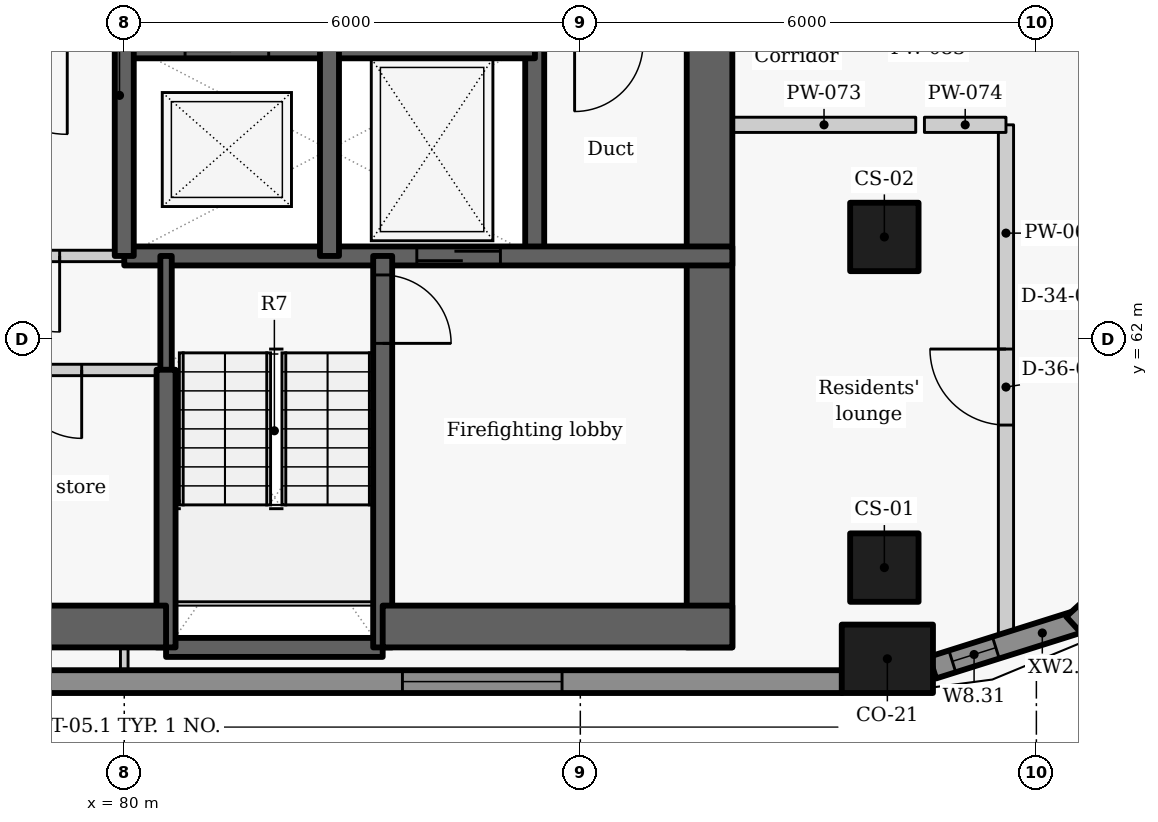
"""IFC4 building model, lengths in metres.
Left out: names, types, materials, properties, quantities, classifications, styles, units other than length and angle.
Written with IfcOpenShell. Run it as: python <this file> out.ifc"""

import sys

from ifc_helpers import new_model, si_unit, direction, frame, frame_2d, origin, origin_2d, place, context, subcontext, project, spatial, rectangle, extrude, element, fill, save


model = new_model("IFC4")
c1 = context("Model", 3, precision=1e-05, world=origin(), true_north=direction((0.0, 1.0)))
c2 = subcontext(c1, "Body", "Model", "MODEL_VIEW")
j1 = project(units=[si_unit("LENGTHUNIT", "METRE"), si_unit("PLANEANGLEUNIT", "RADIAN")], contexts=[c1])
p1 = place(None, origin())
s1 = spatial("IfcSite", under=j1, at=p1, CompositionType="ELEMENT")
p2 = place(p1, origin())
s2 = spatial("IfcBuilding", under=s1, at=p2, CompositionType="ELEMENT")
p3 = place(p2, frame((0.0, 0.0, 216.3)))
s3 = spatial("IfcBuildingStorey", under=s2, at=p3, CompositionType="ELEMENT", Elevation=216.3)
p4 = place(p3, frame((90.04, 57.8, 0.0), z_axis=(0.0, 0.0, 1.0), x_axis=(1.0, 0.0, 0.0)))
e1 = element("IfcColumn", 1, at=p4, inside=s3, PredefinedType="COLUMN", context=c2, shape_type="SweptSolid", body=[
    extrude(rectangle(XDim=1.2, YDim=0.9, at=origin_2d()), origin(), (0.0, 0.0, 1.0), 3.3),
])
for number, where, z_axis, x_axis in (
    (2, (90.0, 59.0, 0.0), (0.0, 0.0, 1.0), (0.0, 1.0, 0.0)),
    (3, (90.0, 63.35, 0.0), (0.0, 0.0, 1.0), (0.0, 1.0, 0.0)),
):
    element("IfcColumn", number, at=place(p3, frame(where, z_axis=z_axis, x_axis=x_axis)), inside=s3, PredefinedType="COLUMN", context=c2, shape_type="SweptSolid", body=[
        extrude(rectangle(XDim=0.9, YDim=0.9, at=origin_2d()), origin(), (0.0, 0.0, 1.0), 3.3),
    ])
p5 = place(p3, frame((70.551, 57.5, 0.0), z_axis=(0.0, 0.0, 1.0), x_axis=(1.0, 0.0, 0.0)))
e4 = element("IfcWall", 4, at=p5, inside=s3, PredefinedType="SOLIDWALL", context=c2, shape_type="SweptSolid", body=[
    extrude(rectangle(XDim=18.893, YDim=0.3, at=frame_2d((9.446, 0.0))), origin(), (0.0, 0.0, 1.0), 2.05),
])
p6 = place(p5, frame((3.687, 0.0, 0.9)))
e5 = element("IfcOpeningElement", 5, at=p6, cuts=e4, PredefinedType="OPENING", context=c2, shape_type="SweptSolid", body=[
    extrude(rectangle(XDim=2.1, YDim=1.1, at=frame_2d((1.05, 0.55))), frame((0.0, 0.16, 0.0), z_axis=(0.0, -1.0, 0.0), x_axis=(1.0, 0.0, 0.0)), (0.0, 0.0, 1.0), 0.32),
])
p7 = place(p5, frame((13.109, 0.0, 0.9)))
e6 = element("IfcOpeningElement", 6, at=p7, cuts=e4, PredefinedType="OPENING", context=c2, shape_type="SweptSolid", body=[
    extrude(rectangle(XDim=2.1, YDim=1.1, at=frame_2d((1.05, 0.55))), frame((0.0, 0.16, 0.0), z_axis=(0.0, -1.0, 0.0), x_axis=(1.0, 0.0, 0.0)), (0.0, 0.0, 1.0), 0.32),
])
p8 = place(p3, frame((90.636, 57.685, 0.0), z_axis=(0.0, 0.0, 1.0), x_axis=(0.95368324118, 0.300812691707, 0.0)))
e7 = element("IfcWall", 7, at=p8, inside=s3, PredefinedType="SOLIDWALL", context=c2, shape_type="SweptSolid", body=[
    extrude(rectangle(XDim=2.053, YDim=0.3, at=frame_2d((1.027, 0.0))), origin(), (0.0, 0.0, 1.0), 2.05),
])
p9 = place(p8, frame((0.271, 0.0, 0.9)))
e8 = element("IfcOpeningElement", 8, at=p9, cuts=e7, PredefinedType="OPENING", context=c2, shape_type="SweptSolid", body=[
    extrude(rectangle(XDim=0.6, YDim=1.1, at=frame_2d((0.3, 0.55))), frame((0.0, 0.16, 0.0), z_axis=(0.0, -1.0, 0.0), x_axis=(1.0, 0.0, 0.0)), (0.0, 0.0, 1.0), 0.32),
])
p10 = place(p3, frame((92.494, 58.244, 0.0), z_axis=(0.0, 0.0, 1.0), x_axis=(0.73764876128, 0.675184645102, 0.0)))
e9 = element("IfcWall", 9, at=p10, inside=s3, PredefinedType="SOLIDWALL", context=c2, shape_type="SweptSolid", body=[
    extrude(rectangle(XDim=2.048, YDim=0.3, at=frame_2d((1.024, 0.0))), origin(), (0.0, 0.0, 1.0), 2.05),
])
p11 = place(p3, frame((85.4, 63.1, -0.275), z_axis=(0.0, 0.0, 1.0), x_axis=(0.0, 1.0, 0.0)))
e10 = element("IfcWall", 10, at=p11, inside=s3, PredefinedType="SHEAR", context=c2, shape_type="SweptSolid", body=[
    extrude(rectangle(XDim=2.8, YDim=0.25, at=frame_2d((1.4, 0.0))), origin(), (0.0, 0.0, 1.0), 3.225),
])
p12 = place(p3, frame((87.7, 72.2, -0.275), z_axis=(0.0, 0.0, 1.0), x_axis=(0.0, -1.0, 0.0)))
e11 = element("IfcWall", 11, at=p12, inside=s3, PredefinedType="SHEAR", context=c2, shape_type="SweptSolid", body=[
    extrude(rectangle(XDim=14.25, YDim=0.6, at=frame_2d((7.125, 0.0))), origin(), (0.0, 0.0, 1.0), 3.225),
])
p13 = place(p12, frame((3.852, 0.0, 0.275)))
e12 = element("IfcOpeningElement", 12, at=p13, cuts=e11, PredefinedType="OPENING", context=c2, shape_type="SweptSolid", body=[
    extrude(rectangle(XDim=1.5, YDim=2.1, at=frame_2d((0.75, 1.05))), frame((0.0, 0.31, 0.0), z_axis=(0.0, -1.0, 0.0), x_axis=(1.0, 0.0, 0.0)), (0.0, 0.0, 1.0), 0.62),
])
p14 = place(p3, frame((79.997, 65.9, -0.275), z_axis=(0.0, 0.0, 1.0), x_axis=(1.0, 0.0, 0.0)))
e13 = element("IfcWall", 13, at=p14, inside=s3, PredefinedType="SHEAR", context=c2, shape_type="SweptSolid", body=[
    extrude(rectangle(XDim=5.406, YDim=0.4, at=frame_2d((2.703, 0.0))), origin(), (0.0, 0.0, 1.0), 3.225),
])
p15 = place(p14, frame((0.803, 0.0, 0.275)))
e14 = element("IfcOpeningElement", 14, at=p15, cuts=e13, PredefinedType="OPENING", context=c2, shape_type="SweptSolid", body=[
    extrude(rectangle(XDim=1.1, YDim=2.1, at=frame_2d((0.55, 1.05))), frame((0.0, 0.21, 0.0), z_axis=(0.0, -1.0, 0.0), x_axis=(1.0, 0.0, 0.0)), (0.0, 0.0, 1.0), 0.42),
])
p16 = place(p3, frame((80.0, 63.1, -0.275), z_axis=(0.0, 0.0, 1.0), x_axis=(1.0, 0.0, 0.0)))
e15 = element("IfcWall", 15, at=p16, inside=s3, PredefinedType="SHEAR", context=c2, shape_type="SweptSolid", body=[
    extrude(rectangle(XDim=8.0, YDim=0.25, at=frame_2d((4.0, 0.0))), origin(), (0.0, 0.0, 1.0), 3.225),
])
p17 = place(p16, frame((3.849, 0.0, 0.275)))
e16 = element("IfcOpeningElement", 16, at=p17, cuts=e15, PredefinedType="OPENING", context=c2, shape_type="SweptSolid", body=[
    extrude(rectangle(XDim=1.1, YDim=2.1, at=frame_2d((0.55, 1.05))), frame((0.0, 0.135, 0.0), z_axis=(0.0, -1.0, 0.0), x_axis=(1.0, 0.0, 0.0)), (0.0, 0.0, 1.0), 0.27),
])
p18 = place(p3, frame((80.0, 63.1, -0.275), z_axis=(0.0, 0.0, 1.0), x_axis=(0.0, 1.0, 0.0)))
e17 = element("IfcWall", 17, at=p18, inside=s3, PredefinedType="SHEAR", context=c2, shape_type="SweptSolid", body=[
    extrude(rectangle(XDim=2.8, YDim=0.25, at=frame_2d((1.4, 0.0))), origin(), (0.0, 0.0, 1.0), 3.225),
])
p19 = place(p3, frame((80.0, 63.1, 0.0), z_axis=(0.0, 0.0, 1.0), x_axis=(-1.0, 0.0, 0.0)))
e18 = element("IfcWall", 18, at=p19, inside=s3, PredefinedType="PARTITIONING", context=c2, shape_type="SweptSolid", body=[
    extrude(rectangle(XDim=2.7, YDim=0.15, at=frame_2d((1.35, 0.0))), origin(), (0.0, 0.0, 1.0), 2.95),
])
p20 = place(p19, frame((0.85, 0.0, 0.0)))
e19 = element("IfcOpeningElement", 19, at=p20, cuts=e18, PredefinedType="OPENING", context=c2, shape_type="SweptSolid", body=[
    extrude(rectangle(XDim=1.0, YDim=2.1, at=frame_2d((0.5, 1.05))), frame((0.0, 0.085, 0.0), z_axis=(0.0, -1.0, 0.0), x_axis=(1.0, 0.0, 0.0)), (0.0, 0.0, 1.0), 0.17),
])
p21 = place(p3, frame((82.7, 63.1, -0.275), z_axis=(0.0, 0.0, 1.0), x_axis=(0.0, 1.0, 0.0)))
e20 = element("IfcWall", 20, at=p21, inside=s3, PredefinedType="SHEAR", context=c2, shape_type="SweptSolid", body=[
    extrude(rectangle(XDim=2.8, YDim=0.25, at=frame_2d((1.4, 0.0))), origin(), (0.0, 0.0, 1.0), 3.225),
])
p22 = place(p3, frame((80.55, 57.95, -0.275), z_axis=(0.0, 0.0, 1.0), x_axis=(1.0, 0.0, 0.0)))
e21 = element("IfcWall", 21, at=p22, inside=s3, PredefinedType="SHEAR", context=c2, shape_type="SweptSolid", body=[
    extrude(rectangle(XDim=2.85, YDim=0.25, at=frame_2d((1.425, 0.0))), origin(), (0.0, 0.0, 1.0), 3.225),
])
p23 = place(p3, frame((83.4, 63.1, -0.275), z_axis=(0.0, 0.0, 1.0), x_axis=(0.0, -1.0, 0.0)))
e22 = element("IfcWall", 22, at=p23, inside=s3, PredefinedType="SHEAR", context=c2, shape_type="SweptSolid", body=[
    extrude(rectangle(XDim=5.15, YDim=0.25, at=frame_2d((2.575, 0.0))), origin(), (0.0, 0.0, 1.0), 3.225),
])
p24 = place(p23, frame((0.25, 0.0, 0.275)))
e23 = element("IfcOpeningElement", 23, at=p24, cuts=e22, PredefinedType="OPENING", context=c2, shape_type="SweptSolid", body=[
    extrude(rectangle(XDim=0.9, YDim=2.1, at=frame_2d((0.45, 1.05))), frame((0.0, 0.135, 0.0), z_axis=(0.0, -1.0, 0.0), x_axis=(1.0, 0.0, 0.0)), (0.0, 0.0, 1.0), 0.27),
])
p25 = place(p3, frame((80.55, 61.597, -0.275), z_axis=(0.0, 0.0, 1.0), x_axis=(0.0, 1.0, 0.0)))
e24 = element("IfcWall", 24, at=p25, inside=s3, PredefinedType="SHEAR", context=c2, shape_type="SweptSolid", body=[
    extrude(rectangle(XDim=1.503, YDim=0.15, at=frame_2d((0.751, 0.0))), origin(), (0.0, 0.0, 1.0), 3.225),
])
p26 = place(p3, frame((80.55, 57.95, -0.275), z_axis=(0.0, 0.0, 1.0), x_axis=(0.0, 1.0, 0.0)))
e25 = element("IfcWall", 25, at=p26, inside=s3, PredefinedType="SHEAR", context=c2, shape_type="SweptSolid", body=[
    extrude(rectangle(XDim=3.653, YDim=0.25, at=frame_2d((1.827, 0.0))), origin(), (0.0, 0.0, 1.0), 3.225),
])
p27 = place(p3, frame((75.35, 58.225, -0.275), z_axis=(0.0, 0.0, 1.0), x_axis=(1.0, 0.0, 0.0)))
e26 = element("IfcWall", 26, at=p27, inside=s3, PredefinedType="SHEAR", context=c2, shape_type="SweptSolid", body=[
    extrude(rectangle(XDim=5.2, YDim=0.55, at=frame_2d((2.6, 0.0))), origin(), (0.0, 0.0, 1.0), 3.225),
])
p28 = place(p3, frame((83.4, 58.225, -0.275), z_axis=(0.0, 0.0, 1.0), x_axis=(1.0, 0.0, 0.0)))
e27 = element("IfcWall", 27, at=p28, inside=s3, PredefinedType="SHEAR", context=c2, shape_type="SweptSolid", body=[
    extrude(rectangle(XDim=4.6, YDim=0.55, at=frame_2d((2.3, 0.0))), origin(), (0.0, 0.0, 1.0), 3.225),
])
p29 = place(p3, frame((80.55, 61.6, 0.0), z_axis=(0.0, 0.0, 1.0), x_axis=(-1.0, 0.0, 0.0)))
e28 = element("IfcWall", 28, at=p29, inside=s3, PredefinedType="PARTITIONING", context=c2, shape_type="SweptSolid", body=[
    extrude(rectangle(XDim=5.2, YDim=0.15, at=frame_2d((2.6, 0.0))), origin(), (0.0, 0.0, 1.0), 2.95),
])
p30 = place(p29, frame((3.71, 0.0, 0.0)))
e29 = element("IfcOpeningElement", 29, at=p30, cuts=e28, PredefinedType="OPENING", context=c2, shape_type="SweptSolid", body=[
    extrude(rectangle(XDim=0.9, YDim=2.1, at=frame_2d((0.45, 1.05))), frame((0.0, 0.085, 0.0), z_axis=(0.0, -1.0, 0.0), x_axis=(1.0, 0.0, 0.0)), (0.0, 0.0, 1.0), 0.17),
])
p31 = place(p29, frame((1.11, 0.0, 0.0)))
e30 = element("IfcOpeningElement", 30, at=p31, cuts=e28, PredefinedType="OPENING", context=c2, shape_type="SweptSolid", body=[
    extrude(rectangle(XDim=0.9, YDim=2.1, at=frame_2d((0.45, 1.05))), frame((0.0, 0.085, 0.0), z_axis=(0.0, -1.0, 0.0), x_axis=(1.0, 0.0, 0.0)), (0.0, 0.0, 1.0), 0.17),
])
p32 = place(p3, frame((91.6, 57.926, 0.0), z_axis=(0.0, 0.0, 1.0), x_axis=(0.0, 1.0, 0.0)))
e31 = element("IfcWall", 31, at=p32, inside=s3, PredefinedType="PARTITIONING", context=c2, shape_type="SweptSolid", body=[
    extrude(rectangle(XDim=6.899, YDim=0.2, at=frame_2d((3.449, 0.0))), origin(), (0.0, 0.0, 1.0), 2.03),
])
p33 = place(p32, frame((2.949, 0.0, 0.0)))
e32 = element("IfcOpeningElement", 32, at=p33, cuts=e31, PredefinedType="OPENING", context=c2, shape_type="SweptSolid", body=[
    extrude(rectangle(XDim=1.0, YDim=2.01, at=frame_2d((0.5, 1.005))), frame((0.0, 0.11, 0.0), z_axis=(0.0, -1.0, 0.0), x_axis=(1.0, 0.0, 0.0)), (0.0, 0.0, 1.0), 0.22),
])
p34 = place(p3, frame((88.0, 64.825, 0.0), z_axis=(0.0, 0.0, 1.0), x_axis=(1.0, 0.0, 0.0)))
e33 = element("IfcWall", 33, at=p34, inside=s3, PredefinedType="PARTITIONING", context=c2, shape_type="SweptSolid", body=[
    extrude(rectangle(XDim=2.413, YDim=0.2, at=frame_2d((1.207, 0.0))), origin(), (0.0, 0.0, 1.0), 2.43),
])
p35 = place(p3, frame((90.527, 64.825, 0.0), z_axis=(0.0, 0.0, 1.0), x_axis=(1.0, 0.0, 0.0)))
e34 = element("IfcWall", 34, at=p35, inside=s3, PredefinedType="PARTITIONING", context=c2, shape_type="SweptSolid", body=[
    extrude(rectangle(XDim=1.073, YDim=0.2, at=frame_2d((0.537, 0.0))), origin(), (0.0, 0.0, 1.0), 2.95),
])
p36 = place(p3, frame((80.0, 57.65, 0.0), z_axis=(0.0, 0.0, 1.0), x_axis=(0.0, 1.0, 0.0)))
e35 = element("IfcWall", 35, at=p36, inside=s3, PredefinedType="PARTITIONING", context=c2, shape_type="SweptSolid", body=[
    extrude(rectangle(XDim=0.3, YDim=0.1, at=frame_2d((0.15, 0.0))), origin(), (0.0, 0.0, 1.0), 2.95),
])
p37 = place(p7, origin())
e36 = element("IfcWindow", 36, at=p37, inside=s3, PartitioningType="SINGLE_PANEL", PredefinedType="WINDOW", context=c2, shape_type="SweptSolid", body=[
    extrude(rectangle(XDim=2.1, YDim=1.1, at=frame_2d((1.05, 0.55))), frame((0.0, 0.03, 0.0), z_axis=(0.0, -1.0, 0.0), x_axis=(1.0, 0.0, 0.0)), (0.0, 0.0, 1.0), 0.06),
])
fill(e6, e36)
p38 = place(p9, origin())
e37 = element("IfcWindow", 37, at=p38, inside=s3, PartitioningType="SINGLE_PANEL", PredefinedType="WINDOW", context=c2, shape_type="SweptSolid", body=[
    extrude(rectangle(XDim=0.6, YDim=1.1, at=frame_2d((0.3, 0.55))), frame((0.0, 0.03, 0.0), z_axis=(0.0, -1.0, 0.0), x_axis=(1.0, 0.0, 0.0)), (0.0, 0.0, 1.0), 0.06),
])
fill(e8, e37)
p39 = place(p17, origin())
e38 = element("IfcDoor", 38, at=p39, inside=s3, OperationType="SLIDING_TO_LEFT", PredefinedType="DOOR", context=c2, shape_type="SweptSolid", body=[
    extrude(rectangle(XDim=1.1, YDim=2.1, at=frame_2d((0.55, 1.05))), frame((0.0, 0.025, 0.0), z_axis=(0.0, -1.0, 0.0), x_axis=(1.0, 0.0, 0.0)), (0.0, 0.0, 1.0), 0.05),
])
fill(e16, e38)
p40 = place(p20, origin())
e39 = element("IfcDoor", 39, at=p40, inside=s3, OperationType="SINGLE_SWING_LEFT", PredefinedType="DOOR", context=c2, shape_type="SweptSolid", body=[
    extrude(rectangle(XDim=1.0, YDim=2.1, at=frame_2d((0.5, 1.05))), frame((0.0, 0.025, 0.0), z_axis=(0.0, -1.0, 0.0), x_axis=(1.0, 0.0, 0.0)), (0.0, 0.0, 1.0), 0.05),
])
fill(e19, e39)
p41 = place(p31, origin())
e40 = element("IfcDoor", 40, at=p41, inside=s3, OperationType="SINGLE_SWING_LEFT", PredefinedType="DOOR", context=c2, shape_type="SweptSolid", body=[
    extrude(rectangle(XDim=0.9, YDim=2.1, at=frame_2d((0.45, 1.05))), frame((0.0, 0.025, 0.0), z_axis=(0.0, -1.0, 0.0), x_axis=(1.0, 0.0, 0.0)), (0.0, 0.0, 1.0), 0.05),
])
fill(e30, e40)
p42 = place(p24, origin())
e41 = element("IfcDoor", 41, at=p42, inside=s3, OperationType="SINGLE_SWING_RIGHT", PredefinedType="DOOR", context=c2, shape_type="SweptSolid", body=[
    extrude(rectangle(XDim=0.9, YDim=2.1, at=frame_2d((0.45, 1.05))), frame((0.0, 0.025, 0.0), z_axis=(0.0, -1.0, 0.0), x_axis=(1.0, 0.0, 0.0)), (0.0, 0.0, 1.0), 0.05),
])
fill(e23, e41)
p43 = place(p33, origin())
e42 = element("IfcDoor", 42, at=p43, inside=s3, OperationType="SINGLE_SWING_RIGHT", PredefinedType="DOOR", context=c2, shape_type="SweptSolid", body=[
    extrude(rectangle(XDim=1.0, YDim=2.01, at=frame_2d((0.5, 1.005))), frame((0.0, 0.025, 0.0), z_axis=(0.0, -1.0, 0.0), x_axis=(1.0, 0.0, 0.0)), (0.0, 0.0, 1.0), 0.05),
])
fill(e32, e42)
save(model, sys.argv[1])
